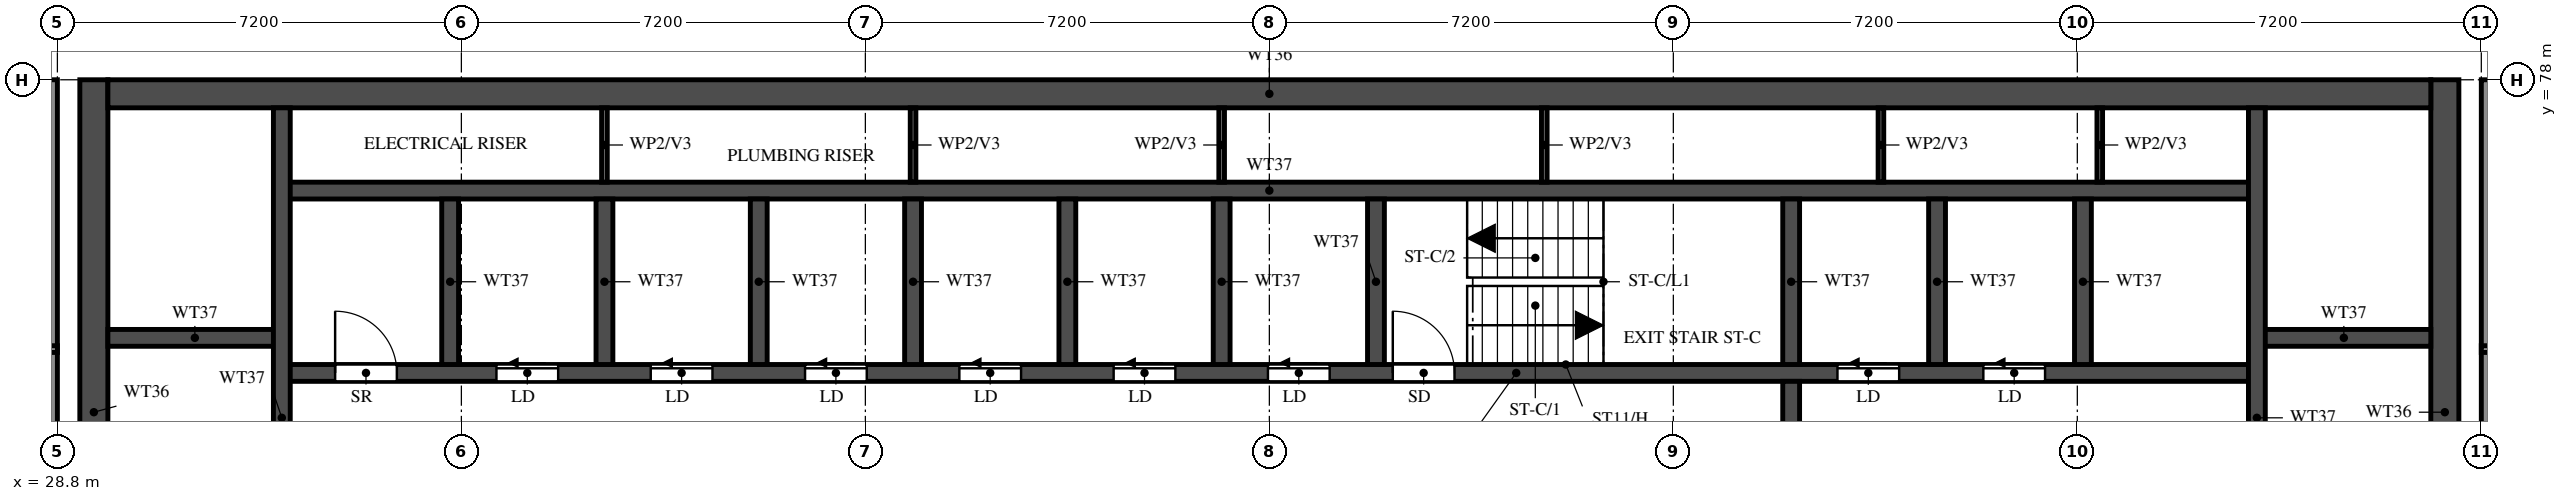
"""IFC4 building model, lengths in metres.
Left out: names, types, materials, properties, quantities, classifications, styles, units other than length and angle.
Written with IfcOpenShell. Run it as: python <this file> out.ifc"""

import sys

from ifc_helpers import new_model, si_unit, direction, frame, frame_2d, origin, place, context, subcontext, project, spatial, rectangle, extrude, element, fill, save


model = new_model("IFC4")
c1 = context("Model", 3, precision=1e-05, world=origin(), true_north=direction((0.0, 1.0)))
c2 = subcontext(c1, "Body", "Model", "MODEL_VIEW")
j1 = project(units=[si_unit("LENGTHUNIT", "METRE"), si_unit("PLANEANGLEUNIT", "RADIAN")], contexts=[c1])
p1 = place(None, origin())
s1 = spatial("IfcSite", under=j1, at=p1, CompositionType="ELEMENT")
p2 = place(p1, origin())
s2 = spatial("IfcBuilding", under=s1, at=p2, CompositionType="ELEMENT")
p3 = place(p2, frame((0.0, 0.0, 222.0)))
s3 = spatial("IfcBuildingStorey", under=s2, at=p3, CompositionType="ELEMENT", Elevation=222.0)
for number, where, z_axis, x_axis in (
    (1, (29.45, 66.15, 0.0), (0.0, 0.0, 1.0), (0.0, 1.0, 0.0)),
    (2, (71.35, 66.15, 0.0), (0.0, 0.0, 1.0), (0.0, 1.0, 0.0)),
):
    element("IfcWall", number, at=place(p3, frame(where, z_axis=z_axis, x_axis=x_axis)), inside=s3, PredefinedType="SHEAR", context=c2, shape_type="SweptSolid", body=[
        extrude(rectangle(XDim=11.85, YDim=0.5, at=frame_2d((5.925, 0.0))), origin(), (0.0, 0.0, 1.0), 3.22),
    ])
p4 = place(p3, frame((29.7, 77.75, 0.0), z_axis=(0.0, 0.0, 1.0), x_axis=(1.0, 0.0, 0.0)))
e3 = element("IfcWall", 3, at=p4, inside=s3, PredefinedType="SHEAR", context=c2, shape_type="SweptSolid", body=[
    extrude(rectangle(XDim=41.4, YDim=0.5, at=frame_2d((20.7, 0.0))), origin(), (0.0, 0.0, 1.0), 3.22),
])
p5 = place(p3, frame((32.8, 72.775, 0.0), z_axis=(0.0, 0.0, 1.0), x_axis=(1.0, 0.0, 0.0)))
e4 = element("IfcWall", 4, at=p5, inside=s3, PredefinedType="SHEAR", context=c2, shape_type="SweptSolid", body=[
    extrude(rectangle(XDim=35.2, YDim=0.3, at=frame_2d((17.6, 0.0))), origin(), (0.0, 0.0, 1.0), 3.22),
])
p6 = place(p5, frame((19.8, 0.0, 0.0)))
e5 = element("IfcOpeningElement", 5, at=p6, cuts=e4, PredefinedType="OPENING", context=c2, shape_type="SweptSolid", body=[
    extrude(rectangle(XDim=1.1, YDim=2.1, at=frame_2d((0.55, 1.05))), frame((0.0, 0.16, 0.0), z_axis=(0.0, -1.0, 0.0), x_axis=(1.0, 0.0, 0.0)), (0.0, 0.0, 1.0), 0.32),
])
p7 = place(p5, frame((27.725, 0.0, 0.0)))
e6 = element("IfcOpeningElement", 6, at=p7, cuts=e4, PredefinedType="OPENING", context=c2, shape_type="SweptSolid", body=[
    extrude(rectangle(XDim=1.1, YDim=2.1, at=frame_2d((0.55, 1.05))), frame((0.0, 0.16, 0.0), z_axis=(0.0, -1.0, 0.0), x_axis=(1.0, 0.0, 0.0)), (0.0, 0.0, 1.0), 0.32),
])
p8 = place(p5, frame((30.325, 0.0, 0.0)))
e7 = element("IfcOpeningElement", 7, at=p8, cuts=e4, PredefinedType="OPENING", context=c2, shape_type="SweptSolid", body=[
    extrude(rectangle(XDim=1.1, YDim=2.1, at=frame_2d((0.55, 1.05))), frame((0.0, 0.16, 0.0), z_axis=(0.0, -1.0, 0.0), x_axis=(1.0, 0.0, 0.0)), (0.0, 0.0, 1.0), 0.32),
])
p9 = place(p5, frame((3.825, 0.0, 0.0)))
e8 = element("IfcOpeningElement", 8, at=p9, cuts=e4, PredefinedType="OPENING", context=c2, shape_type="SweptSolid", body=[
    extrude(rectangle(XDim=1.1, YDim=2.1, at=frame_2d((0.55, 1.05))), frame((0.0, 0.16, 0.0), z_axis=(0.0, -1.0, 0.0), x_axis=(1.0, 0.0, 0.0)), (0.0, 0.0, 1.0), 0.32),
])
p10 = place(p5, frame((6.575, 0.0, 0.0)))
e9 = element("IfcOpeningElement", 9, at=p10, cuts=e4, PredefinedType="OPENING", context=c2, shape_type="SweptSolid", body=[
    extrude(rectangle(XDim=1.1, YDim=2.1, at=frame_2d((0.55, 1.05))), frame((0.0, 0.16, 0.0), z_axis=(0.0, -1.0, 0.0), x_axis=(1.0, 0.0, 0.0)), (0.0, 0.0, 1.0), 0.32),
])
p11 = place(p5, frame((9.325, 0.0, 0.0)))
e10 = element("IfcOpeningElement", 10, at=p11, cuts=e4, PredefinedType="OPENING", context=c2, shape_type="SweptSolid", body=[
    extrude(rectangle(XDim=1.1, YDim=2.1, at=frame_2d((0.55, 1.05))), frame((0.0, 0.16, 0.0), z_axis=(0.0, -1.0, 0.0), x_axis=(1.0, 0.0, 0.0)), (0.0, 0.0, 1.0), 0.32),
])
p12 = place(p5, frame((12.075, 0.0, 0.0)))
e11 = element("IfcOpeningElement", 11, at=p12, cuts=e4, PredefinedType="OPENING", context=c2, shape_type="SweptSolid", body=[
    extrude(rectangle(XDim=1.1, YDim=2.1, at=frame_2d((0.55, 1.05))), frame((0.0, 0.16, 0.0), z_axis=(0.0, -1.0, 0.0), x_axis=(1.0, 0.0, 0.0)), (0.0, 0.0, 1.0), 0.32),
])
p13 = place(p5, frame((14.825, 0.0, 0.0)))
e12 = element("IfcOpeningElement", 12, at=p13, cuts=e4, PredefinedType="OPENING", context=c2, shape_type="SweptSolid", body=[
    extrude(rectangle(XDim=1.1, YDim=2.1, at=frame_2d((0.55, 1.05))), frame((0.0, 0.16, 0.0), z_axis=(0.0, -1.0, 0.0), x_axis=(1.0, 0.0, 0.0)), (0.0, 0.0, 1.0), 0.32),
])
p14 = place(p5, frame((17.575, 0.0, 0.0)))
e13 = element("IfcOpeningElement", 13, at=p14, cuts=e4, PredefinedType="OPENING", context=c2, shape_type="SweptSolid", body=[
    extrude(rectangle(XDim=1.1, YDim=2.1, at=frame_2d((0.55, 1.05))), frame((0.0, 0.16, 0.0), z_axis=(0.0, -1.0, 0.0), x_axis=(1.0, 0.0, 0.0)), (0.0, 0.0, 1.0), 0.32),
])
p15 = place(p5, frame((0.95, 0.0, 0.0)))
e14 = element("IfcOpeningElement", 14, at=p15, cuts=e4, PredefinedType="OPENING", context=c2, shape_type="SweptSolid", body=[
    extrude(rectangle(XDim=1.1, YDim=2.1, at=frame_2d((0.55, 1.05))), frame((0.0, 0.16, 0.0), z_axis=(0.0, -1.0, 0.0), x_axis=(1.0, 0.0, 0.0)), (0.0, 0.0, 1.0), 0.32),
])
p16 = place(p3, frame((32.8, 76.025, 0.0), z_axis=(0.0, 0.0, 1.0), x_axis=(1.0, 0.0, 0.0)))
e15 = element("IfcWall", 15, at=p16, inside=s3, PredefinedType="SHEAR", context=c2, shape_type="SweptSolid", body=[
    extrude(rectangle(XDim=35.2, YDim=0.3, at=frame_2d((17.6, 0.0))), origin(), (0.0, 0.0, 1.0), 3.22),
])
for number, where, z_axis, x_axis in (
    (16, (29.7, 73.4, 0.0), (0.0, 0.0, 1.0), (1.0, 0.0, 0.0)),
    (17, (68.0, 73.4, 0.0), (0.0, 0.0, 1.0), (1.0, 0.0, 0.0)),
):
    element("IfcWall", number, at=place(p3, frame(where, z_axis=z_axis, x_axis=x_axis)), inside=s3, PredefinedType="SHEAR", context=c2, shape_type="SweptSolid", body=[
        extrude(rectangle(XDim=3.1, YDim=0.3, at=frame_2d((1.55, 0.0))), origin(), (0.0, 0.0, 1.0), 3.22),
    ])
p17 = place(p3, frame((32.8, 66.45, 0.0), z_axis=(0.0, 0.0, 1.0), x_axis=(0.0, 1.0, 0.0)))
e18 = element("IfcWall", 18, at=p17, inside=s3, PredefinedType="SHEAR", context=c2, shape_type="SweptSolid", body=[
    extrude(rectangle(XDim=11.05, YDim=0.3, at=frame_2d((5.525, 0.0))), origin(), (0.0, 0.0, 1.0), 3.22),
])
p18 = place(p3, frame((68.0, 66.45, 0.0), z_axis=(0.0, 0.0, 1.0), x_axis=(0.0, 1.0, 0.0)))
e19 = element("IfcWall", 19, at=p18, inside=s3, PredefinedType="SHEAR", context=c2, shape_type="SweptSolid", body=[
    extrude(rectangle(XDim=11.05, YDim=0.3, at=frame_2d((5.525, 0.0))), origin(), (0.0, 0.0, 1.0), 3.22),
])
p19 = place(p18, frame((0.15, 0.0, 0.0)))
e20 = element("IfcOpeningElement", 20, at=p19, cuts=e19, PredefinedType="OPENING", context=c2, shape_type="SweptSolid", body=[
    extrude(rectangle(XDim=1.1, YDim=2.1, at=frame_2d((0.55, 1.05))), frame((0.0, 0.16, 0.0), z_axis=(0.0, -1.0, 0.0), x_axis=(1.0, 0.0, 0.0)), (0.0, 0.0, 1.0), 0.32),
])
p20 = place(p3, frame((59.7, 66.45, 0.0), z_axis=(0.0, 0.0, 1.0), x_axis=(0.0, 1.0, 0.0)))
e21 = element("IfcWall", 21, at=p20, inside=s3, PredefinedType="SHEAR", context=c2, shape_type="SweptSolid", body=[
    extrude(rectangle(XDim=6.175, YDim=0.3, at=frame_2d((3.087, 0.0))), origin(), (0.0, 0.0, 1.0), 3.22),
])
p21 = place(p20, frame((3.85, 0.0, 0.0)))
e22 = element("IfcOpeningElement", 22, at=p21, cuts=e21, PredefinedType="OPENING", context=c2, shape_type="SweptSolid", body=[
    extrude(rectangle(XDim=1.2, YDim=2.1, at=frame_2d((0.6, 1.05))), frame((0.0, 0.16, 0.0), z_axis=(0.0, -1.0, 0.0), x_axis=(1.0, 0.0, 0.0)), (0.0, 0.0, 1.0), 0.32),
])
for number, where, z_axis, x_axis in (
    (23, (59.7, 72.925, 0.0), (0.0, 0.0, 1.0), (0.0, 1.0, 0.0)),
    (24, (35.8, 72.925, 0.0), (0.0, 0.0, 1.0), (0.0, 1.0, 0.0)),
    (25, (38.55, 72.925, 0.0), (0.0, 0.0, 1.0), (0.0, 1.0, 0.0)),
    (26, (41.3, 72.925, 0.0), (0.0, 0.0, 1.0), (0.0, 1.0, 0.0)),
    (27, (44.05, 72.925, 0.0), (0.0, 0.0, 1.0), (0.0, 1.0, 0.0)),
    (28, (46.8, 72.925, 0.0), (0.0, 0.0, 1.0), (0.0, 1.0, 0.0)),
    (29, (49.55, 72.925, 0.0), (0.0, 0.0, 1.0), (0.0, 1.0, 0.0)),
    (30, (52.3, 72.925, 0.0), (0.0, 0.0, 1.0), (0.0, 1.0, 0.0)),
    (31, (62.3, 72.925, 0.0), (0.0, 0.0, 1.0), (0.0, 1.0, 0.0)),
    (32, (64.9, 72.925, 0.0), (0.0, 0.0, 1.0), (0.0, 1.0, 0.0)),
):
    element("IfcWall", number, at=place(p3, frame(where, z_axis=z_axis, x_axis=x_axis)), inside=s3, PredefinedType="SHEAR", context=c2, shape_type="SweptSolid", body=[
        extrude(rectangle(XDim=2.95, YDim=0.3, at=frame_2d((1.475, 0.0))), origin(), (0.0, 0.0, 1.0), 3.22),
    ])
for number, where, z_axis, x_axis in (
    (33, (38.55, 76.175, 0.0), (0.0, 0.0, 1.0), (0.0, 1.0, 0.0)),
    (34, (44.05, 76.175, 0.0), (0.0, 0.0, 1.0), (0.0, 1.0, 0.0)),
    (35, (49.55, 76.175, 0.0), (0.0, 0.0, 1.0), (0.0, 1.0, 0.0)),
    (36, (55.3, 76.175, 0.0), (0.0, 0.0, 1.0), (0.0, 1.0, 0.0)),
    (37, (61.3, 76.175, 0.0), (0.0, 0.0, 1.0), (0.0, 1.0, 0.0)),
    (38, (65.2, 76.175, 0.0), (0.0, 0.0, 1.0), (0.0, 1.0, 0.0)),
):
    element("IfcWall", number, at=place(p3, frame(where, z_axis=z_axis, x_axis=x_axis)), inside=s3, PredefinedType="PARTITIONING", context=c2, shape_type="SweptSolid", body=[
        extrude(rectangle(XDim=1.325, YDim=0.1, at=frame_2d((0.663, 0.0))), origin(), (0.0, 0.0, 1.0), 3.22),
    ])
for number, where, z_axis, x_axis in (
    (39, (28.7, 62.4, 0.0), (0.0, 0.0, 1.0), (0.0, 1.0, 0.0)),
    (40, (72.1, 62.4, 0.0), (0.0, 0.0, 1.0), (0.0, 1.0, 0.0)),
):
    element("IfcWall", number, at=place(p3, frame(where, z_axis=z_axis, x_axis=x_axis)), inside=s3, PredefinedType="SOLIDWALL", context=c2, shape_type="SweptSolid", body=[
        extrude(rectangle(XDim=15.6, YDim=0.2, at=frame_2d((7.8, 0.0))), origin(), (0.0, 0.0, 1.0), 3.22),
    ])
p22 = place(p3, frame((18.525, 73.2, 0.0), z_axis=(0.0, 0.0, 1.0), x_axis=(1.0, 0.0, 0.0)))
e41 = element("IfcWall", 41, at=p22, inside=s3, PredefinedType="PARTITIONING", context=c2, shape_type="SweptSolid", body=[
    extrude(rectangle(XDim=10.275, YDim=0.12, at=frame_2d((5.138, 0.0))), origin(), (0.0, 0.0, 1.0), 2.32),
])
p23 = place(p22, frame((5.275, 0.0, 0.0)))
e42 = element("IfcOpeningElement", 42, at=p23, cuts=e41, PredefinedType="OPENING", context=c2, shape_type="SweptSolid", body=[
    extrude(rectangle(XDim=0.9, YDim=2.1, at=frame_2d((0.45, 1.05))), frame((0.0, 0.07, 0.0), z_axis=(0.0, -1.0, 0.0), x_axis=(1.0, 0.0, 0.0)), (0.0, 0.0, 1.0), 0.14),
])
p24 = place(p3, frame((72.0, 73.2, 0.0), z_axis=(0.0, 0.0, 1.0), x_axis=(1.0, 0.0, 0.0)))
e43 = element("IfcWall", 43, at=p24, inside=s3, PredefinedType="PARTITIONING", context=c2, shape_type="SweptSolid", body=[
    extrude(rectangle(XDim=10.275, YDim=0.12, at=frame_2d((5.137, 0.0))), origin(), (0.0, 0.0, 1.0), 2.32),
])
p25 = place(p24, frame((4.1, 0.0, 0.0)))
e44 = element("IfcOpeningElement", 44, at=p25, cuts=e43, PredefinedType="OPENING", context=c2, shape_type="SweptSolid", body=[
    extrude(rectangle(XDim=0.9, YDim=2.1, at=frame_2d((0.45, 1.05))), frame((0.0, 0.07, 0.0), z_axis=(0.0, -1.0, 0.0), x_axis=(1.0, 0.0, 0.0)), (0.0, 0.0, 1.0), 0.14),
])
p26 = place(p6, origin())
e45 = element("IfcDoor", 45, at=p26, inside=s3, OperationType="SINGLE_SWING_LEFT", PredefinedType="DOOR", context=c2, shape_type="SweptSolid", body=[
    extrude(rectangle(XDim=1.1, YDim=2.1, at=frame_2d((0.55, 1.05))), frame((0.0, 0.025, 0.0), z_axis=(0.0, -1.0, 0.0), x_axis=(1.0, 0.0, 0.0)), (0.0, 0.0, 1.0), 0.05),
])
fill(e5, e45)
p27 = place(p7, origin())
e46 = element("IfcDoor", 46, at=p27, inside=s3, OperationType="SLIDING_TO_LEFT", PredefinedType="DOOR", context=c2, shape_type="SweptSolid", body=[
    extrude(rectangle(XDim=1.1, YDim=2.1, at=frame_2d((0.55, 1.05))), frame((0.0, 0.025, 0.0), z_axis=(0.0, -1.0, 0.0), x_axis=(1.0, 0.0, 0.0)), (0.0, 0.0, 1.0), 0.05),
])
fill(e6, e46)
p28 = place(p8, origin())
e47 = element("IfcDoor", 47, at=p28, inside=s3, OperationType="SLIDING_TO_LEFT", PredefinedType="DOOR", context=c2, shape_type="SweptSolid", body=[
    extrude(rectangle(XDim=1.1, YDim=2.1, at=frame_2d((0.55, 1.05))), frame((0.0, 0.025, 0.0), z_axis=(0.0, -1.0, 0.0), x_axis=(1.0, 0.0, 0.0)), (0.0, 0.0, 1.0), 0.05),
])
fill(e7, e47)
p29 = place(p9, origin())
e48 = element("IfcDoor", 48, at=p29, inside=s3, OperationType="SLIDING_TO_LEFT", PredefinedType="DOOR", context=c2, shape_type="SweptSolid", body=[
    extrude(rectangle(XDim=1.1, YDim=2.1, at=frame_2d((0.55, 1.05))), frame((0.0, 0.025, 0.0), z_axis=(0.0, -1.0, 0.0), x_axis=(1.0, 0.0, 0.0)), (0.0, 0.0, 1.0), 0.05),
])
fill(e8, e48)
p30 = place(p10, origin())
e49 = element("IfcDoor", 49, at=p30, inside=s3, OperationType="SLIDING_TO_LEFT", PredefinedType="DOOR", context=c2, shape_type="SweptSolid", body=[
    extrude(rectangle(XDim=1.1, YDim=2.1, at=frame_2d((0.55, 1.05))), frame((0.0, 0.025, 0.0), z_axis=(0.0, -1.0, 0.0), x_axis=(1.0, 0.0, 0.0)), (0.0, 0.0, 1.0), 0.05),
])
fill(e9, e49)
p31 = place(p11, origin())
e50 = element("IfcDoor", 50, at=p31, inside=s3, OperationType="SLIDING_TO_LEFT", PredefinedType="DOOR", context=c2, shape_type="SweptSolid", body=[
    extrude(rectangle(XDim=1.1, YDim=2.1, at=frame_2d((0.55, 1.05))), frame((0.0, 0.025, 0.0), z_axis=(0.0, -1.0, 0.0), x_axis=(1.0, 0.0, 0.0)), (0.0, 0.0, 1.0), 0.05),
])
fill(e10, e50)
p32 = place(p12, origin())
e51 = element("IfcDoor", 51, at=p32, inside=s3, OperationType="SLIDING_TO_LEFT", PredefinedType="DOOR", context=c2, shape_type="SweptSolid", body=[
    extrude(rectangle(XDim=1.1, YDim=2.1, at=frame_2d((0.55, 1.05))), frame((0.0, 0.025, 0.0), z_axis=(0.0, -1.0, 0.0), x_axis=(1.0, 0.0, 0.0)), (0.0, 0.0, 1.0), 0.05),
])
fill(e11, e51)
p33 = place(p13, origin())
e52 = element("IfcDoor", 52, at=p33, inside=s3, OperationType="SLIDING_TO_LEFT", PredefinedType="DOOR", context=c2, shape_type="SweptSolid", body=[
    extrude(rectangle(XDim=1.1, YDim=2.1, at=frame_2d((0.55, 1.05))), frame((0.0, 0.025, 0.0), z_axis=(0.0, -1.0, 0.0), x_axis=(1.0, 0.0, 0.0)), (0.0, 0.0, 1.0), 0.05),
])
fill(e12, e52)
p34 = place(p14, origin())
e53 = element("IfcDoor", 53, at=p34, inside=s3, OperationType="SLIDING_TO_LEFT", PredefinedType="DOOR", context=c2, shape_type="SweptSolid", body=[
    extrude(rectangle(XDim=1.1, YDim=2.1, at=frame_2d((0.55, 1.05))), frame((0.0, 0.025, 0.0), z_axis=(0.0, -1.0, 0.0), x_axis=(1.0, 0.0, 0.0)), (0.0, 0.0, 1.0), 0.05),
])
fill(e13, e53)
p35 = place(p15, origin())
e54 = element("IfcDoor", 54, at=p35, inside=s3, OperationType="SINGLE_SWING_LEFT", PredefinedType="DOOR", context=c2, shape_type="SweptSolid", body=[
    extrude(rectangle(XDim=1.1, YDim=2.1, at=frame_2d((0.55, 1.05))), frame((0.0, 0.025, 0.0), z_axis=(0.0, -1.0, 0.0), x_axis=(1.0, 0.0, 0.0)), (0.0, 0.0, 1.0), 0.05),
])
fill(e14, e54)
save(model, sys.argv[1])
